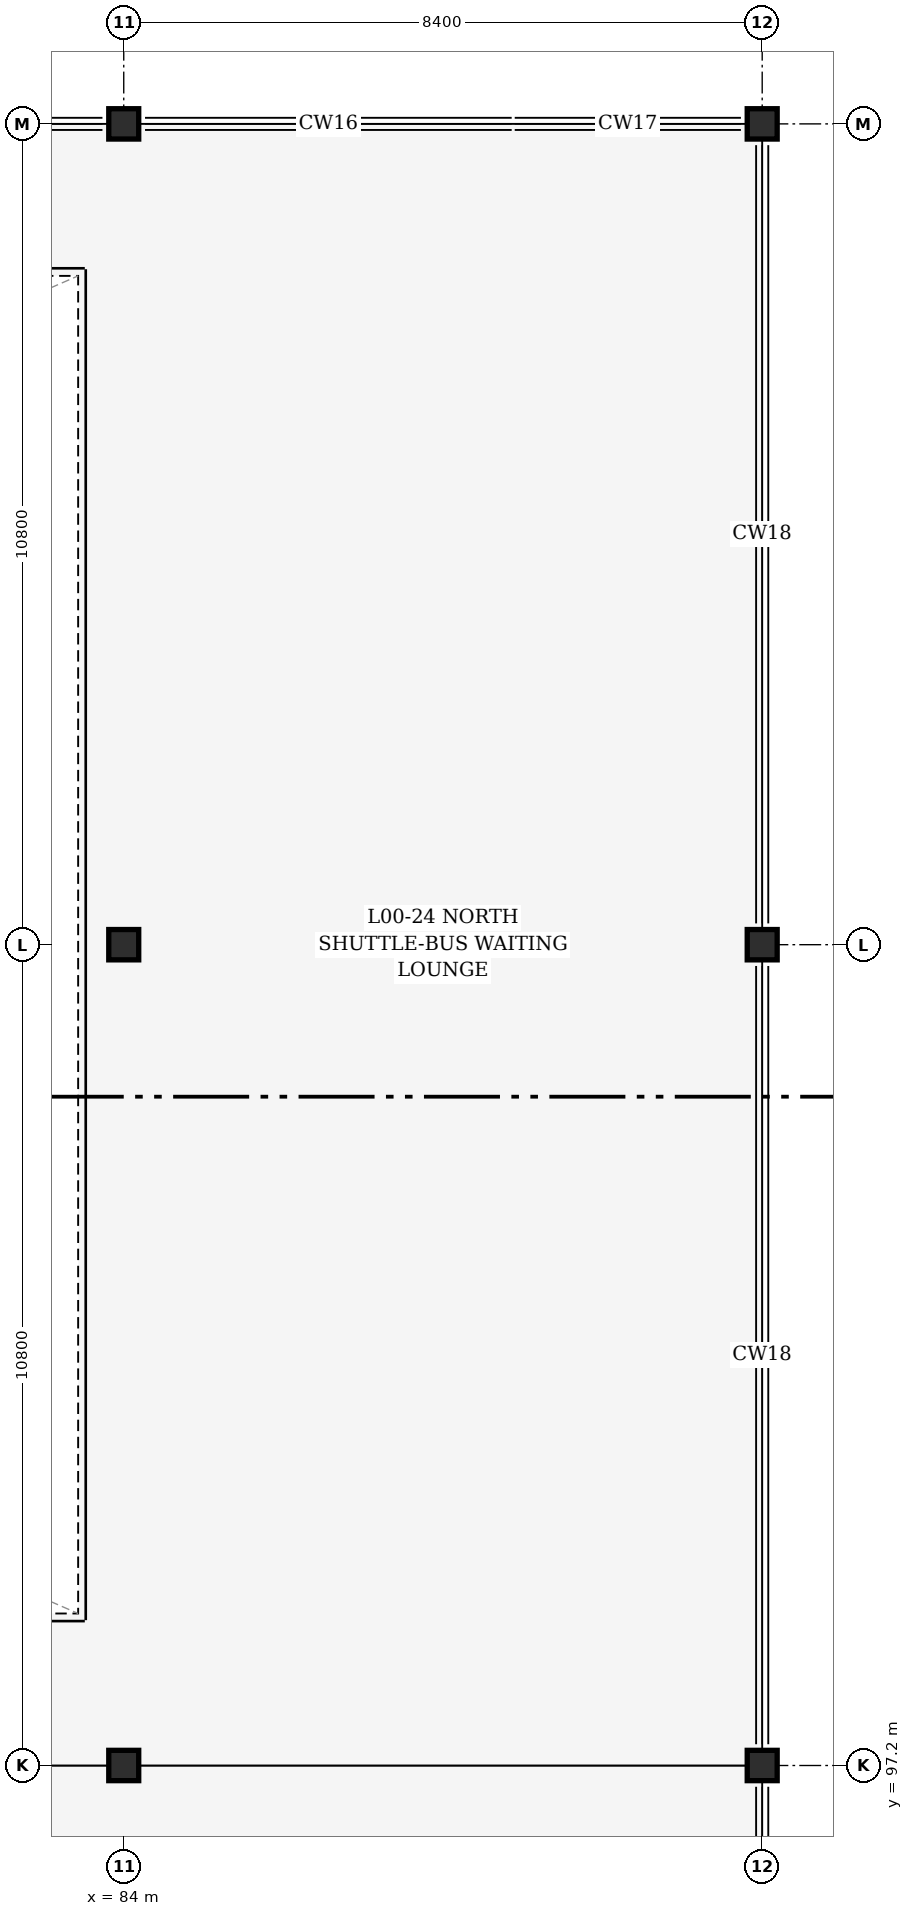
"""IFC4 building model, lengths in metres.
Left out: names, types, materials, properties, quantities, classifications, styles, units other than length and angle.
Written with IfcOpenShell. Run it as: python <this file> out.ifc"""

import sys

from ifc_helpers import new_model, si_unit, direction, frame, origin, origin_2d, place, context, subcontext, project, spatial, i_section, extrude, element, save


model = new_model("IFC4")
c1 = context("Model", 3, precision=1e-05, world=origin(), true_north=direction((0.0, 1.0)))
c2 = subcontext(c1, "Body", "Model", "MODEL_VIEW")
j1 = project(units=[si_unit("LENGTHUNIT", "METRE"), si_unit("PLANEANGLEUNIT", "RADIAN")], contexts=[c1])
p1 = place(None, origin())
s1 = spatial("IfcSite", under=j1, at=p1, CompositionType="ELEMENT")
p2 = place(p1, origin())
s2 = spatial("IfcBuilding", under=s1, at=p2, CompositionType="ELEMENT")
p3 = place(p2, origin())
s3 = spatial("IfcBuildingStorey", under=s2, at=p3, CompositionType="ELEMENT", Elevation=0.0)
for number, where, z_axis, x_axis in (
    (1, (84.0, 97.2, 0.0), (0.0, 0.0, 1.0), (1.0, 0.0, 0.0)),
    (2, (84.0, 108.0, 0.0), (0.0, 0.0, 1.0), (1.0, 0.0, 0.0)),
    (3, (84.0, 118.8, 0.0), (0.0, 0.0, 1.0), (1.0, 0.0, 0.0)),
    (4, (92.4, 97.2, 0.0), (0.0, 0.0, 1.0), (1.0, 0.0, 0.0)),
    (5, (92.4, 108.0, 0.0), (0.0, 0.0, 1.0), (1.0, 0.0, 0.0)),
    (6, (92.4, 118.8, 0.0), (0.0, 0.0, 1.0), (1.0, 0.0, 0.0)),
):
    element("IfcColumn", number, at=place(p3, frame(where, z_axis=z_axis, x_axis=x_axis)), inside=s3, PredefinedType="COLUMN", context=c2, shape_type="SweptSolid", body=[
        extrude(i_section(OverallWidth=0.399, OverallDepth=0.394, WebThickness=0.023, FlangeThickness=0.037, FilletRadius=0.015, at=origin_2d()), origin(), (0.0, 0.0, 1.0), 5.4),
    ])
save(model, sys.argv[1])
